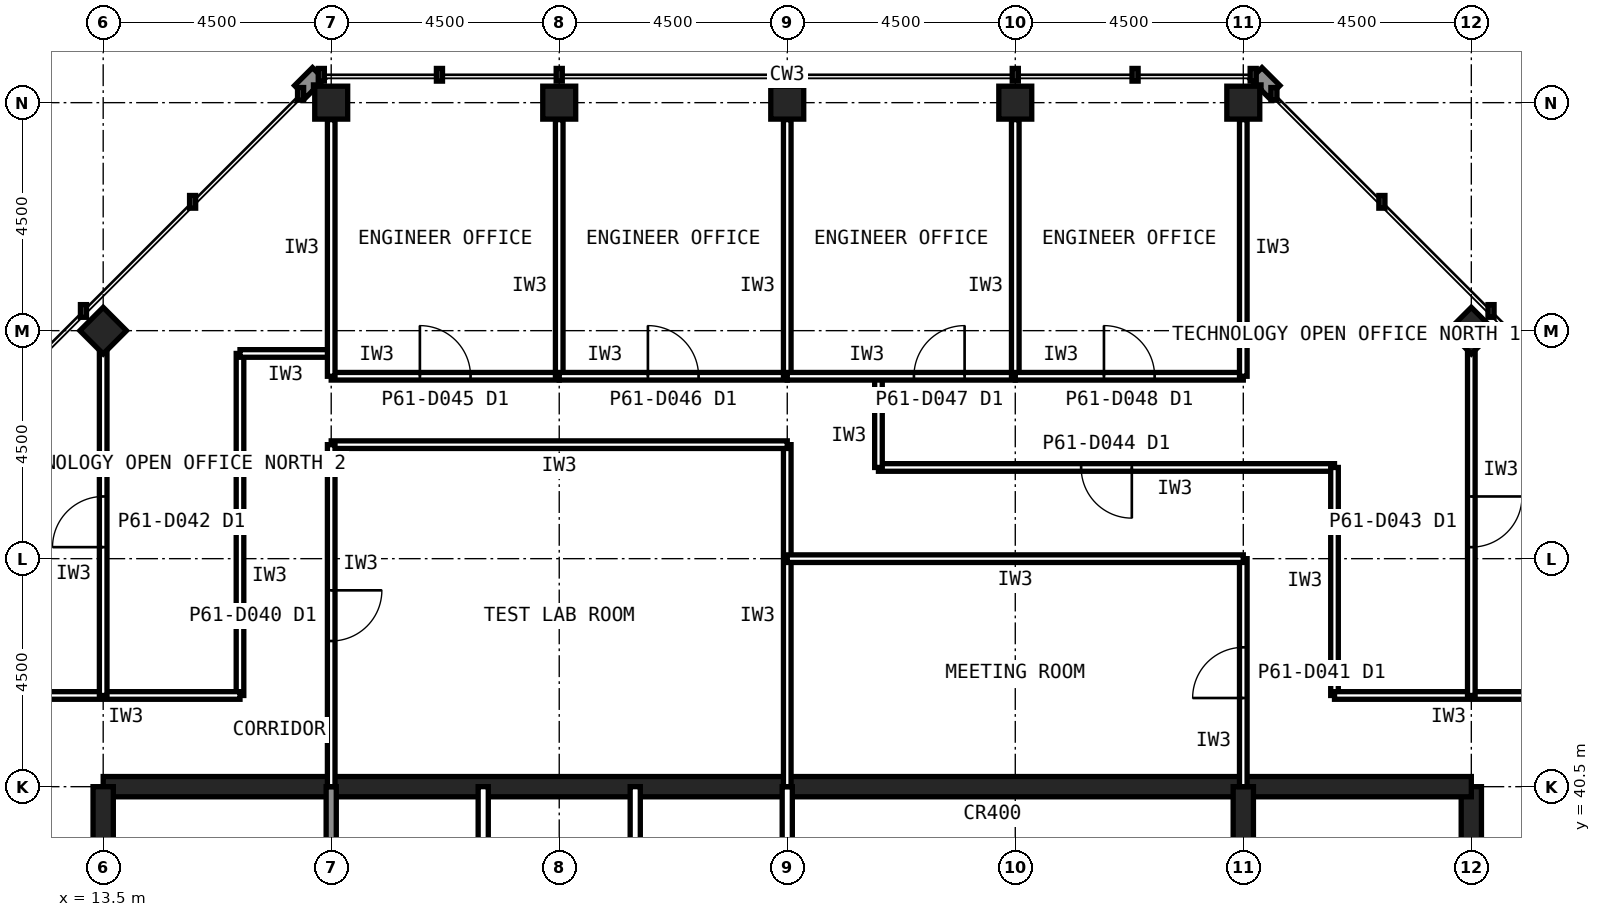
"""IFC4 building model, lengths in metres.
Left out: names, types, materials, properties, quantities, classifications, styles, units other than length and angle.
Written with IfcOpenShell. Run it as: python <this file> out.ifc"""

import sys

from ifc_helpers import new_model, si_unit, direction, frame, frame_2d, origin, origin_2d, place, context, subcontext, project, spatial, rectangle, hollow_rectangle, extrude, element, fill, save


model = new_model("IFC4")
c1 = context("Model", 3, precision=1e-05, world=origin(), true_north=direction((0.0, 1.0)))
c2 = subcontext(c1, "Body", "Model", "MODEL_VIEW")
j1 = project(units=[si_unit("LENGTHUNIT", "METRE"), si_unit("PLANEANGLEUNIT", "RADIAN")], contexts=[c1])
p1 = place(None, origin())
s1 = spatial("IfcSite", under=j1, at=p1, CompositionType="ELEMENT")
p2 = place(p1, origin())
s2 = spatial("IfcBuilding", under=s1, at=p2, CompositionType="ELEMENT")
p3 = place(p2, frame((0.0, 0.0, 254.6)))
s3 = spatial("IfcBuildingStorey", under=s2, at=p3, CompositionType="ELEMENT", Elevation=254.6)
for number, where, z_axis, x_axis in (
    (1, (36.0, 54.0, 0.0), (0.0, 0.0, 1.0), (1.0, 0.0, 0.0)),
    (2, (31.5, 54.0, 0.0), (0.0, 0.0, 1.0), (1.0, 0.0, 0.0)),
    (3, (27.0, 54.0, 0.0), (0.0, 0.0, 1.0), (1.0, 0.0, 0.0)),
    (4, (22.5, 54.0, 0.0), (0.0, 0.0, 1.0), (1.0, 0.0, 0.0)),
    (5, (18.0, 54.0, 0.0), (0.0, 0.0, 1.0), (1.0, 0.0, 0.0)),
    (6, (40.5, 49.5, 0.0), (0.0, 0.0, 1.0), (0.707, 0.707, 0.0)),
    (7, (13.5, 49.5, 0.0), (0.0, 0.0, 1.0), (0.707, 0.707, 0.0)),
):
    element("IfcColumn", number, at=place(p3, frame(where, z_axis=z_axis, x_axis=x_axis)), inside=s3, PredefinedType="COLUMN", context=c2, shape_type="SweptSolid", body=[
        extrude(hollow_rectangle(XDim=0.65, YDim=0.65, WallThickness=0.032, at=origin_2d()), origin(), (0.0, 0.0, 1.0), 4.0),
    ])
p4 = place(p3, frame((40.5, 13.5, 0.0), z_axis=(0.0, 0.0, 1.0), x_axis=(0.0, 1.0, 0.0)))
e8 = element("IfcWall", 8, at=p4, inside=s3, PredefinedType="SHEAR", context=c2, shape_type="SweptSolid", body=[
    extrude(rectangle(XDim=27.0, YDim=0.4, at=frame_2d((13.5, 0.0))), origin(), (0.0, 0.0, 1.0), 4.0),
])
p5 = place(p4, frame((5.85, 0.0, 0.0)))
e9 = element("IfcOpeningElement", 9, at=p5, cuts=e8, PredefinedType="OPENING", context=c2, shape_type="SweptSolid", body=[
    extrude(rectangle(XDim=1.8, YDim=2.1, at=frame_2d((0.9, 1.05))), frame((0.0, 0.21, 0.0), z_axis=(0.0, -1.0, 0.0), x_axis=(1.0, 0.0, 0.0)), (0.0, 0.0, 1.0), 0.42),
])
p6 = place(p4, frame((19.65, 0.0, 0.0)))
e10 = element("IfcOpeningElement", 10, at=p6, cuts=e8, PredefinedType="OPENING", context=c2, shape_type="SweptSolid", body=[
    extrude(rectangle(XDim=1.2, YDim=2.1, at=frame_2d((0.6, 1.05))), frame((0.0, 0.21, 0.0), z_axis=(0.0, -1.0, 0.0), x_axis=(1.0, 0.0, 0.0)), (0.0, 0.0, 1.0), 0.42),
])
p7 = place(p3, frame((40.5, 40.5, 0.0), z_axis=(0.0, 0.0, 1.0), x_axis=(-1.0, 0.0, 0.0)))
e11 = element("IfcWall", 11, at=p7, inside=s3, PredefinedType="SHEAR", context=c2, shape_type="SweptSolid", body=[
    extrude(rectangle(XDim=27.0, YDim=0.4, at=frame_2d((13.5, 0.0))), origin(), (0.0, 0.0, 1.0), 4.0),
])
p8 = place(p3, frame((13.5, 40.5, 0.0), z_axis=(0.0, 0.0, 1.0), x_axis=(0.0, -1.0, 0.0)))
e12 = element("IfcWall", 12, at=p8, inside=s3, PredefinedType="SHEAR", context=c2, shape_type="SweptSolid", body=[
    extrude(rectangle(XDim=27.0, YDim=0.4, at=frame_2d((13.5, 0.0))), origin(), (0.0, 0.0, 1.0), 4.0),
])
p9 = place(p8, frame((19.65, 0.0, 0.0)))
e13 = element("IfcOpeningElement", 13, at=p9, cuts=e12, PredefinedType="OPENING", context=c2, shape_type="SweptSolid", body=[
    extrude(rectangle(XDim=1.2, YDim=2.1, at=frame_2d((0.6, 1.05))), frame((0.0, 0.21, 0.0), z_axis=(0.0, -1.0, 0.0), x_axis=(1.0, 0.0, 0.0)), (0.0, 0.0, 1.0), 0.42),
])
p10 = place(p8, frame((5.85, 0.0, 0.0)))
e14 = element("IfcOpeningElement", 14, at=p10, cuts=e12, PredefinedType="OPENING", context=c2, shape_type="SweptSolid", body=[
    extrude(rectangle(XDim=1.8, YDim=2.1, at=frame_2d((0.9, 1.05))), frame((0.0, 0.21, 0.0), z_axis=(0.0, -1.0, 0.0), x_axis=(1.0, 0.0, 0.0)), (0.0, 0.0, 1.0), 0.42),
])
p11 = place(p3, frame((18.0, 36.0, 0.0), z_axis=(0.0, 0.0, 1.0), x_axis=(0.0, 1.0, 0.0)))
e15 = element("IfcWall", 15, at=p11, inside=s3, PredefinedType="SOLIDWALL", context=c2, shape_type="SweptSolid", body=[
    extrude(rectangle(XDim=4.5, YDim=0.2, at=frame_2d((2.25, 0.0))), origin(), (0.0, 0.0, 1.0), 3.84),
])
p12 = place(p3, frame((36.0, 22.5, 0.0), z_axis=(0.0, 0.0, 1.0), x_axis=(0.0, 1.0, 0.0)))
e16 = element("IfcWall", 16, at=p12, inside=s3, PredefinedType="SHEAR", context=c2, shape_type="SweptSolid", body=[
    extrude(rectangle(XDim=18.0, YDim=0.4, at=frame_2d((9.0, 0.0))), origin(), (0.0, 0.0, 1.0), 4.0),
])
for number, where, z_axis, x_axis in (
    (17, (27.0, 36.0, 0.0), (0.0, 0.0, 1.0), (0.0, 1.0, 0.0)),
    (18, (30.0, 36.0, 0.0), (0.0, 0.0, 1.0), (0.0, 1.0, 0.0)),
):
    element("IfcWall", number, at=place(p3, frame(where, z_axis=z_axis, x_axis=x_axis)), inside=s3, PredefinedType="PARTITIONING", context=c2, shape_type="SweptSolid", body=[
        extrude(rectangle(XDim=4.5, YDim=0.2, at=frame_2d((2.25, 0.0))), origin(), (0.0, 0.0, 1.0), 3.84),
    ])
p13 = place(p3, frame((37.8, 46.8, 0.0), z_axis=(0.0, 0.0, 1.0), x_axis=(-1.0, 0.0, 0.0)))
e19 = element("IfcWall", 19, at=p13, inside=s3, PredefinedType="PARTITIONING", context=c2, shape_type="SweptSolid", body=[
    extrude(rectangle(XDim=9.0, YDim=0.15, at=frame_2d((4.5, 0.0))), origin(), (0.0, 0.0, 1.0), 3.84),
])
p14 = place(p13, frame((4.0, 0.0, 0.0)))
e20 = element("IfcOpeningElement", 20, at=p14, cuts=e19, PredefinedType="OPENING", context=c2, shape_type="SweptSolid", body=[
    extrude(rectangle(XDim=1.0, YDim=2.1, at=frame_2d((0.5, 1.05))), frame((0.0, 0.085, 0.0), z_axis=(0.0, -1.0, 0.0), x_axis=(1.0, 0.0, 0.0)), (0.0, 0.0, 1.0), 0.17),
])
p15 = place(p3, frame((16.2, 49.05, 0.0), z_axis=(0.0, 0.0, 1.0), x_axis=(0.0, -1.0, 0.0)))
e21 = element("IfcWall", 21, at=p15, inside=s3, PredefinedType="PARTITIONING", context=c2, shape_type="SweptSolid", body=[
    extrude(rectangle(XDim=6.75, YDim=0.15, at=frame_2d((3.375, 0.0))), origin(), (0.0, 0.0, 1.0), 3.84),
])
for number, where, z_axis, x_axis in (
    (22, (16.2, 42.3, 0.0), (0.0, 0.0, 1.0), (-1.0, 0.0, 0.0)),
    (23, (37.8, 42.3, 0.0), (0.0, 0.0, 1.0), (0.0, 1.0, 0.0)),
    (24, (42.3, 42.3, 0.0), (0.0, 0.0, 1.0), (-1.0, 0.0, 0.0)),
):
    element("IfcWall", number, at=place(p3, frame(where, z_axis=z_axis, x_axis=x_axis)), inside=s3, PredefinedType="PARTITIONING", context=c2, shape_type="SweptSolid", body=[
        extrude(rectangle(XDim=4.5, YDim=0.15, at=frame_2d((2.25, 0.0))), origin(), (0.0, 0.0, 1.0), 3.84),
    ])
for number, where, z_axis, x_axis in (
    (25, (18.0, 49.05, 0.0), (0.0, 0.0, 1.0), (-1.0, 0.0, 0.0)),
    (26, (28.8, 46.8, 0.0), (0.0, 0.0, 1.0), (0.0, 1.0, 0.0)),
):
    element("IfcWall", number, at=place(p3, frame(where, z_axis=z_axis, x_axis=x_axis)), inside=s3, PredefinedType="PARTITIONING", context=c2, shape_type="SweptSolid", body=[
        extrude(rectangle(XDim=1.8, YDim=0.15, at=frame_2d((0.9, 0.0))), origin(), (0.0, 0.0, 1.0), 3.84),
    ])
p16 = place(p3, frame((27.0, 40.5, 0.0), z_axis=(0.0, 0.0, 1.0), x_axis=(0.0, 1.0, 0.0)))
e27 = element("IfcWall", 27, at=p16, inside=s3, PredefinedType="PARTITIONING", context=c2, shape_type="SweptSolid", body=[
    extrude(rectangle(XDim=6.75, YDim=0.15, at=frame_2d((3.375, 0.0))), origin(), (0.0, 0.0, 1.0), 2.989),
])
p17 = place(p3, frame((27.0, 47.25, 0.0), z_axis=(0.0, 0.0, 1.0), x_axis=(-1.0, 0.0, 0.0)))
e28 = element("IfcWall", 28, at=p17, inside=s3, PredefinedType="PARTITIONING", context=c2, shape_type="SweptSolid", body=[
    extrude(rectangle(XDim=9.0, YDim=0.15, at=frame_2d((4.5, 0.0))), origin(), (0.0, 0.0, 1.0), 3.84),
])
p18 = place(p3, frame((18.0, 47.25, 0.0), z_axis=(0.0, 0.0, 1.0), x_axis=(0.0, -1.0, 0.0)))
e29 = element("IfcWall", 29, at=p18, inside=s3, PredefinedType="PARTITIONING", context=c2, shape_type="SweptSolid", body=[
    extrude(rectangle(XDim=6.75, YDim=0.15, at=frame_2d((3.375, 0.0))), origin(), (0.0, 0.0, 1.0), 2.989),
])
p19 = place(p18, frame((2.875, 0.0, 0.0)))
e30 = element("IfcOpeningElement", 30, at=p19, cuts=e29, PredefinedType="OPENING", context=c2, shape_type="SweptSolid", body=[
    extrude(rectangle(XDim=1.0, YDim=2.1, at=frame_2d((0.5, 1.05))), frame((0.0, 0.085, 0.0), z_axis=(0.0, -1.0, 0.0), x_axis=(1.0, 0.0, 0.0)), (0.0, 0.0, 1.0), 0.17),
])
p20 = place(p3, frame((36.0, 40.5, 0.0), z_axis=(0.0, 0.0, 1.0), x_axis=(0.0, 1.0, 0.0)))
e31 = element("IfcWall", 31, at=p20, inside=s3, PredefinedType="PARTITIONING", context=c2, shape_type="SweptSolid", body=[
    extrude(rectangle(XDim=4.5, YDim=0.15, at=frame_2d((2.25, 0.0))), origin(), (0.0, 0.0, 1.0), 2.989),
])
p21 = place(p20, frame((1.75, 0.0, 0.0)))
e32 = element("IfcOpeningElement", 32, at=p21, cuts=e31, PredefinedType="OPENING", context=c2, shape_type="SweptSolid", body=[
    extrude(rectangle(XDim=1.0, YDim=2.1, at=frame_2d((0.5, 1.05))), frame((0.0, 0.085, 0.0), z_axis=(0.0, -1.0, 0.0), x_axis=(1.0, 0.0, 0.0)), (0.0, 0.0, 1.0), 0.17),
])
p22 = place(p3, frame((36.0, 45.0, 0.0), z_axis=(0.0, 0.0, 1.0), x_axis=(-1.0, 0.0, 0.0)))
e33 = element("IfcWall", 33, at=p22, inside=s3, PredefinedType="PARTITIONING", context=c2, shape_type="SweptSolid", body=[
    extrude(rectangle(XDim=9.0, YDim=0.15, at=frame_2d((4.5, 0.0))), origin(), (0.0, 0.0, 1.0), 3.84),
])
p23 = place(p3, frame((18.0, 48.6, 0.0), z_axis=(0.0, 0.0, 1.0), x_axis=(1.0, 0.0, 0.0)))
e34 = element("IfcWall", 34, at=p23, inside=s3, PredefinedType="PARTITIONING", context=c2, shape_type="SweptSolid", body=[
    extrude(rectangle(XDim=4.5, YDim=0.15, at=frame_2d((2.25, 0.0))), origin(), (0.0, 0.0, 1.0), 3.84),
])
p24 = place(p23, frame((1.75, 0.0, 0.0)))
e35 = element("IfcOpeningElement", 35, at=p24, cuts=e34, PredefinedType="OPENING", context=c2, shape_type="SweptSolid", body=[
    extrude(rectangle(XDim=1.0, YDim=2.1, at=frame_2d((0.5, 1.05))), frame((0.0, 0.085, 0.0), z_axis=(0.0, -1.0, 0.0), x_axis=(1.0, 0.0, 0.0)), (0.0, 0.0, 1.0), 0.17),
])
for number, where, z_axis, x_axis in (
    (36, (22.5, 48.6, 0.0), (0.0, 0.0, 1.0), (0.0, 1.0, 0.0)),
    (37, (18.0, 53.665, 0.0), (0.0, 0.0, 1.0), (0.0, -1.0, 0.0)),
):
    element("IfcWall", number, at=place(p3, frame(where, z_axis=z_axis, x_axis=x_axis)), inside=s3, PredefinedType="PARTITIONING", context=c2, shape_type="SweptSolid", body=[
        extrude(rectangle(XDim=5.065, YDim=0.15, at=frame_2d((2.532, 0.0))), origin(), (0.0, 0.0, 1.0), 2.989),
    ])
p25 = place(p3, frame((22.5, 48.6, 0.0), z_axis=(0.0, 0.0, 1.0), x_axis=(1.0, 0.0, 0.0)))
e38 = element("IfcWall", 38, at=p25, inside=s3, PredefinedType="PARTITIONING", context=c2, shape_type="SweptSolid", body=[
    extrude(rectangle(XDim=4.5, YDim=0.15, at=frame_2d((2.25, 0.0))), origin(), (0.0, 0.0, 1.0), 3.84),
])
p26 = place(p25, frame((1.75, 0.0, 0.0)))
e39 = element("IfcOpeningElement", 39, at=p26, cuts=e38, PredefinedType="OPENING", context=c2, shape_type="SweptSolid", body=[
    extrude(rectangle(XDim=1.0, YDim=2.1, at=frame_2d((0.5, 1.05))), frame((0.0, 0.085, 0.0), z_axis=(0.0, -1.0, 0.0), x_axis=(1.0, 0.0, 0.0)), (0.0, 0.0, 1.0), 0.17),
])
p27 = place(p3, frame((27.0, 48.6, 0.0), z_axis=(0.0, 0.0, 1.0), x_axis=(0.0, 1.0, 0.0)))
e40 = element("IfcWall", 40, at=p27, inside=s3, PredefinedType="PARTITIONING", context=c2, shape_type="SweptSolid", body=[
    extrude(rectangle(XDim=5.065, YDim=0.15, at=frame_2d((2.532, 0.0))), origin(), (0.0, 0.0, 1.0), 2.989),
])
p28 = place(p3, frame((27.0, 48.6, 0.0), z_axis=(0.0, 0.0, 1.0), x_axis=(1.0, 0.0, 0.0)))
e41 = element("IfcWall", 41, at=p28, inside=s3, PredefinedType="PARTITIONING", context=c2, shape_type="SweptSolid", body=[
    extrude(rectangle(XDim=4.5, YDim=0.15, at=frame_2d((2.25, 0.0))), origin(), (0.0, 0.0, 1.0), 3.84),
])
p29 = place(p28, frame((2.5, 0.0, 0.0)))
e42 = element("IfcOpeningElement", 42, at=p29, cuts=e41, PredefinedType="OPENING", context=c2, shape_type="SweptSolid", body=[
    extrude(rectangle(XDim=1.0, YDim=2.1, at=frame_2d((0.5, 1.05))), frame((0.0, 0.085, 0.0), z_axis=(0.0, -1.0, 0.0), x_axis=(1.0, 0.0, 0.0)), (0.0, 0.0, 1.0), 0.17),
])
p30 = place(p3, frame((31.5, 48.6, 0.0), z_axis=(0.0, 0.0, 1.0), x_axis=(0.0, 1.0, 0.0)))
e43 = element("IfcWall", 43, at=p30, inside=s3, PredefinedType="PARTITIONING", context=c2, shape_type="SweptSolid", body=[
    extrude(rectangle(XDim=5.065, YDim=0.15, at=frame_2d((2.532, 0.0))), origin(), (0.0, 0.0, 1.0), 2.989),
])
p31 = place(p3, frame((31.5, 48.6, 0.0), z_axis=(0.0, 0.0, 1.0), x_axis=(1.0, 0.0, 0.0)))
e44 = element("IfcWall", 44, at=p31, inside=s3, PredefinedType="PARTITIONING", context=c2, shape_type="SweptSolid", body=[
    extrude(rectangle(XDim=4.5, YDim=0.15, at=frame_2d((2.25, 0.0))), origin(), (0.0, 0.0, 1.0), 3.84),
])
p32 = place(p31, frame((1.75, 0.0, 0.0)))
e45 = element("IfcOpeningElement", 45, at=p32, cuts=e44, PredefinedType="OPENING", context=c2, shape_type="SweptSolid", body=[
    extrude(rectangle(XDim=1.0, YDim=2.1, at=frame_2d((0.5, 1.05))), frame((0.0, 0.085, 0.0), z_axis=(0.0, -1.0, 0.0), x_axis=(1.0, 0.0, 0.0)), (0.0, 0.0, 1.0), 0.17),
])
p33 = place(p3, frame((36.0, 48.6, 0.0), z_axis=(0.0, 0.0, 1.0), x_axis=(0.0, 1.0, 0.0)))
e46 = element("IfcWall", 46, at=p33, inside=s3, PredefinedType="PARTITIONING", context=c2, shape_type="SweptSolid", body=[
    extrude(rectangle(XDim=5.065, YDim=0.15, at=frame_2d((2.532, 0.0))), origin(), (0.0, 0.0, 1.0), 2.989),
])
p34 = place(p3, frame((40.5, 49.155, 0.0), z_axis=(0.0, 0.0, 1.0), x_axis=(0.0, -1.0, 0.0)))
e47 = element("IfcWall", 47, at=p34, inside=s3, PredefinedType="PARTITIONING", context=c2, shape_type="SweptSolid", body=[
    extrude(rectangle(XDim=6.855, YDim=0.15, at=frame_2d((3.427, 0.0))), origin(), (0.0, 0.0, 1.0), 2.989),
])
p35 = place(p34, frame((2.927, 0.0, 0.0)))
e48 = element("IfcOpeningElement", 48, at=p35, cuts=e47, PredefinedType="OPENING", context=c2, shape_type="SweptSolid", body=[
    extrude(rectangle(XDim=1.0, YDim=2.1, at=frame_2d((0.5, 1.05))), frame((0.0, 0.085, 0.0), z_axis=(0.0, -1.0, 0.0), x_axis=(1.0, 0.0, 0.0)), (0.0, 0.0, 1.0), 0.17),
])
p36 = place(p3, frame((13.5, 42.3, 0.0), z_axis=(0.0, 0.0, 1.0), x_axis=(0.0, 1.0, 0.0)))
e49 = element("IfcWall", 49, at=p36, inside=s3, PredefinedType="PARTITIONING", context=c2, shape_type="SweptSolid", body=[
    extrude(rectangle(XDim=6.855, YDim=0.15, at=frame_2d((3.427, 0.0))), origin(), (0.0, 0.0, 1.0), 2.989),
])
p37 = place(p36, frame((2.927, 0.0, 0.0)))
e50 = element("IfcOpeningElement", 50, at=p37, cuts=e49, PredefinedType="OPENING", context=c2, shape_type="SweptSolid", body=[
    extrude(rectangle(XDim=1.0, YDim=2.1, at=frame_2d((0.5, 1.05))), frame((0.0, 0.085, 0.0), z_axis=(0.0, -1.0, 0.0), x_axis=(1.0, 0.0, 0.0)), (0.0, 0.0, 1.0), 0.17),
])
p38 = place(p14, origin())
e51 = element("IfcDoor", 51, at=p38, inside=s3, OperationType="SINGLE_SWING_LEFT", PredefinedType="DOOR", context=c2, shape_type="SweptSolid", body=[
    extrude(rectangle(XDim=1.0, YDim=2.1, at=frame_2d((0.5, 1.05))), frame((0.0, 0.025, 0.0), z_axis=(0.0, -1.0, 0.0), x_axis=(1.0, 0.0, 0.0)), (0.0, 0.0, 1.0), 0.05),
])
fill(e20, e51)
p39 = place(p19, origin())
e52 = element("IfcDoor", 52, at=p39, inside=s3, OperationType="SINGLE_SWING_LEFT", PredefinedType="DOOR", context=c2, shape_type="SweptSolid", body=[
    extrude(rectangle(XDim=1.0, YDim=2.1, at=frame_2d((0.5, 1.05))), frame((0.0, 0.025, 0.0), z_axis=(0.0, -1.0, 0.0), x_axis=(1.0, 0.0, 0.0)), (0.0, 0.0, 1.0), 0.05),
])
fill(e30, e52)
p40 = place(p21, origin())
e53 = element("IfcDoor", 53, at=p40, inside=s3, OperationType="SINGLE_SWING_LEFT", PredefinedType="DOOR", context=c2, shape_type="SweptSolid", body=[
    extrude(rectangle(XDim=1.0, YDim=2.1, at=frame_2d((0.5, 1.05))), frame((0.0, 0.025, 0.0), z_axis=(0.0, -1.0, 0.0), x_axis=(1.0, 0.0, 0.0)), (0.0, 0.0, 1.0), 0.05),
])
fill(e32, e53)
p41 = place(p24, origin())
e54 = element("IfcDoor", 54, at=p41, inside=s3, OperationType="SINGLE_SWING_LEFT", PredefinedType="DOOR", context=c2, shape_type="SweptSolid", body=[
    extrude(rectangle(XDim=1.0, YDim=2.1, at=frame_2d((0.5, 1.05))), frame((0.0, 0.025, 0.0), z_axis=(0.0, -1.0, 0.0), x_axis=(1.0, 0.0, 0.0)), (0.0, 0.0, 1.0), 0.05),
])
fill(e35, e54)
p42 = place(p26, origin())
e55 = element("IfcDoor", 55, at=p42, inside=s3, OperationType="SINGLE_SWING_LEFT", PredefinedType="DOOR", context=c2, shape_type="SweptSolid", body=[
    extrude(rectangle(XDim=1.0, YDim=2.1, at=frame_2d((0.5, 1.05))), frame((0.0, 0.025, 0.0), z_axis=(0.0, -1.0, 0.0), x_axis=(1.0, 0.0, 0.0)), (0.0, 0.0, 1.0), 0.05),
])
fill(e39, e55)
p43 = place(p29, origin())
e56 = element("IfcDoor", 56, at=p43, inside=s3, OperationType="SINGLE_SWING_RIGHT", PredefinedType="DOOR", context=c2, shape_type="SweptSolid", body=[
    extrude(rectangle(XDim=1.0, YDim=2.1, at=frame_2d((0.5, 1.05))), frame((0.0, 0.025, 0.0), z_axis=(0.0, -1.0, 0.0), x_axis=(1.0, 0.0, 0.0)), (0.0, 0.0, 1.0), 0.05),
])
fill(e42, e56)
p44 = place(p32, origin())
e57 = element("IfcDoor", 57, at=p44, inside=s3, OperationType="SINGLE_SWING_LEFT", PredefinedType="DOOR", context=c2, shape_type="SweptSolid", body=[
    extrude(rectangle(XDim=1.0, YDim=2.1, at=frame_2d((0.5, 1.05))), frame((0.0, 0.025, 0.0), z_axis=(0.0, -1.0, 0.0), x_axis=(1.0, 0.0, 0.0)), (0.0, 0.0, 1.0), 0.05),
])
fill(e45, e57)
p45 = place(p35, origin())
e58 = element("IfcDoor", 58, at=p45, inside=s3, OperationType="SINGLE_SWING_LEFT", PredefinedType="DOOR", context=c2, shape_type="SweptSolid", body=[
    extrude(rectangle(XDim=1.0, YDim=2.1, at=frame_2d((0.5, 1.05))), frame((0.0, 0.025, 0.0), z_axis=(0.0, -1.0, 0.0), x_axis=(1.0, 0.0, 0.0)), (0.0, 0.0, 1.0), 0.05),
])
fill(e48, e58)
p46 = place(p37, origin())
e59 = element("IfcDoor", 59, at=p46, inside=s3, OperationType="SINGLE_SWING_LEFT", PredefinedType="DOOR", context=c2, shape_type="SweptSolid", body=[
    extrude(rectangle(XDim=1.0, YDim=2.1, at=frame_2d((0.5, 1.05))), frame((0.0, 0.025, 0.0), z_axis=(0.0, -1.0, 0.0), x_axis=(1.0, 0.0, 0.0)), (0.0, 0.0, 1.0), 0.05),
])
fill(e50, e59)
save(model, sys.argv[1])
